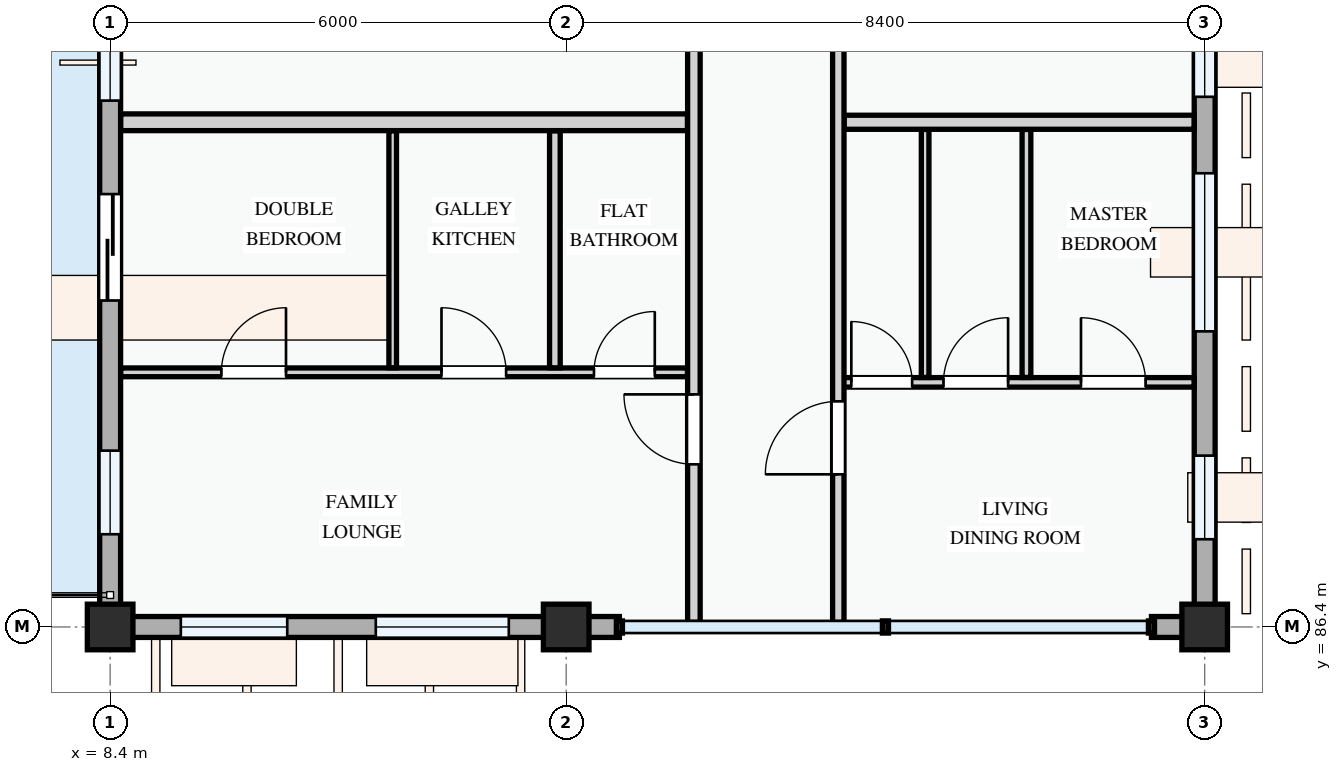
"""IFC4 building model, lengths in metres.
Left out: names, types, materials, properties, quantities, classifications, styles, units other than length and angle.
Written with IfcOpenShell. Run it as: python <this file> out.ifc"""

import sys

from ifc_helpers import new_model, si_unit, direction, frame, frame_2d, origin, origin_2d, place, context, subcontext, project, spatial, rectangle, extrude, element, fill, save


model = new_model("IFC4")
c1 = context("Model", 3, precision=1e-05, world=origin(), true_north=direction((0.0, 1.0)))
c2 = subcontext(c1, "Body", "Model", "MODEL_VIEW")
j1 = project(units=[si_unit("LENGTHUNIT", "METRE"), si_unit("PLANEANGLEUNIT", "RADIAN")], contexts=[c1])
p1 = place(None, origin())
s1 = spatial("IfcSite", under=j1, at=p1, CompositionType="ELEMENT")
p2 = place(p1, origin())
s2 = spatial("IfcBuilding", under=s1, at=p2, CompositionType="ELEMENT")
p3 = place(p2, frame((0.0, 0.0, 31.2)))
s3 = spatial("IfcBuildingStorey", under=s2, at=p3, CompositionType="ELEMENT", Elevation=31.2)
for number, where, z_axis, x_axis in (
    (1, (8.4, 86.4, 0.0), (0.0, 0.0, 1.0), (1.0, 0.0, 0.0)),
    (2, (14.4, 86.4, 0.0), (0.0, 0.0, 1.0), (1.0, 0.0, 0.0)),
    (3, (22.8, 86.4, 0.0), (0.0, 0.0, 1.0), (1.0, 0.0, 0.0)),
):
    element("IfcColumn", number, at=place(p3, frame(where, z_axis=z_axis, x_axis=x_axis)), inside=s3, PredefinedType="COLUMN", context=c2, shape_type="SweptSolid", body=[
        extrude(rectangle(XDim=0.6, YDim=0.6, at=origin_2d()), origin(), (0.0, 0.0, 1.0), 3.3),
    ])
p4 = place(p3, frame((8.4, 94.8, 0.0), z_axis=(0.0, 0.0, 1.0), x_axis=(0.0, -1.0, 0.0)))
e4 = element("IfcWall", 4, at=p4, inside=s3, PredefinedType="STANDARD", context=c2, shape_type="SweptSolid", body=[
    extrude(rectangle(XDim=8.4, YDim=0.275, at=frame_2d((4.2, 0.0))), origin(), (0.0, 0.0, 1.0), 2.425),
])
p5 = place(p4, frame((2.705, 0.0, 0.0)))
e5 = element("IfcOpeningElement", 5, at=p5, cuts=e4, PredefinedType="OPENING", context=c2, shape_type="SweptSolid", body=[
    extrude(rectangle(XDim=1.4, YDim=2.2, at=frame_2d((0.7, 1.1))), frame((0.0, 0.147, 0.0), z_axis=(0.0, -1.0, 0.0), x_axis=(1.0, 0.0, 0.0)), (0.0, 0.0, 1.0), 0.295),
])
p6 = place(p4, frame((0.475, 0.0, 0.78)))
e6 = element("IfcOpeningElement", 6, at=p6, cuts=e4, PredefinedType="OPENING", context=c2, shape_type="SweptSolid", body=[
    extrude(rectangle(XDim=1.0, YDim=1.25, at=frame_2d((0.5, 0.625))), frame((0.0, 0.147, 0.0), z_axis=(0.0, -1.0, 0.0), x_axis=(1.0, 0.0, 0.0)), (0.0, 0.0, 1.0), 0.295),
])
p7 = place(p4, frame((6.08, 0.0, 0.78)))
e7 = element("IfcOpeningElement", 7, at=p7, cuts=e4, PredefinedType="OPENING", context=c2, shape_type="SweptSolid", body=[
    extrude(rectangle(XDim=1.1, YDim=1.3, at=frame_2d((0.55, 0.65))), frame((0.0, 0.147, 0.0), z_axis=(0.0, -1.0, 0.0), x_axis=(1.0, 0.0, 0.0)), (0.0, 0.0, 1.0), 0.295),
])
p8 = place(p3, frame((8.4, 86.4, 0.0), z_axis=(0.0, 0.0, 1.0), x_axis=(1.0, 0.0, 0.0)))
e8 = element("IfcWall", 8, at=p8, inside=s3, PredefinedType="STANDARD", context=c2, shape_type="SweptSolid", body=[
    extrude(rectangle(XDim=6.0, YDim=0.275, at=frame_2d((3.0, 0.0))), origin(), (0.0, 0.0, 1.0), 2.525),
])
p9 = place(p8, frame((0.93, 0.0, 0.78)))
e9 = element("IfcOpeningElement", 9, at=p9, cuts=e8, PredefinedType="OPENING", context=c2, shape_type="SweptSolid", body=[
    extrude(rectangle(XDim=1.4, YDim=1.45, at=frame_2d((0.7, 0.725))), frame((0.0, 0.147, 0.0), z_axis=(0.0, -1.0, 0.0), x_axis=(1.0, 0.0, 0.0)), (0.0, 0.0, 1.0), 0.295),
])
p10 = place(p8, frame((3.495, 0.0, 0.78)))
e10 = element("IfcOpeningElement", 10, at=p10, cuts=e8, PredefinedType="OPENING", context=c2, shape_type="SweptSolid", body=[
    extrude(rectangle(XDim=1.75, YDim=1.45, at=frame_2d((0.875, 0.725))), frame((0.0, 0.147, 0.0), z_axis=(0.0, -1.0, 0.0), x_axis=(1.0, 0.0, 0.0)), (0.0, 0.0, 1.0), 0.295),
])
p11 = place(p3, frame((14.4, 86.4, 0.0), z_axis=(0.0, 0.0, 1.0), x_axis=(1.0, 0.0, 0.0)))
e11 = element("IfcWall", 11, at=p11, inside=s3, PredefinedType="STANDARD", context=c2, shape_type="SweptSolid", body=[
    extrude(rectangle(XDim=0.7, YDim=0.275, at=frame_2d((0.35, 0.0))), origin(), (0.0, 0.0, 1.0), 2.375),
])
p12 = place(p3, frame((22.1, 86.4, 0.0), z_axis=(0.0, 0.0, 1.0), x_axis=(1.0, 0.0, 0.0)))
e12 = element("IfcWall", 12, at=p12, inside=s3, PredefinedType="STANDARD", context=c2, shape_type="SweptSolid", body=[
    extrude(rectangle(XDim=0.56, YDim=0.275, at=frame_2d((0.28, 0.0))), origin(), (0.0, 0.0, 1.0), 2.375),
])
p13 = place(p3, frame((22.8, 86.4, 0.0), z_axis=(0.0, 0.0, 1.0), x_axis=(0.0, 1.0, 0.0)))
e13 = element("IfcWall", 13, at=p13, inside=s3, PredefinedType="STANDARD", context=c2, shape_type="SweptSolid", body=[
    extrude(rectangle(XDim=8.4, YDim=0.275, at=frame_2d((4.2, 0.0))), origin(), (0.0, 0.0, 1.0), 2.425),
])
p14 = place(p13, frame((1.154, 0.0, 0.78)))
e14 = element("IfcOpeningElement", 14, at=p14, cuts=e13, PredefinedType="OPENING", context=c2, shape_type="SweptSolid", body=[
    extrude(rectangle(XDim=1.1, YDim=1.3, at=frame_2d((0.55, 0.65))), frame((0.0, 0.147, 0.0), z_axis=(0.0, -1.0, 0.0), x_axis=(1.0, 0.0, 0.0)), (0.0, 0.0, 1.0), 0.295),
])
p15 = place(p13, frame((3.889, 0.0, 0.78)))
e15 = element("IfcOpeningElement", 15, at=p15, cuts=e13, PredefinedType="OPENING", context=c2, shape_type="SweptSolid", body=[
    extrude(rectangle(XDim=2.08, YDim=1.52, at=frame_2d((1.04, 0.76))), frame((0.0, 0.147, 0.0), z_axis=(0.0, -1.0, 0.0), x_axis=(1.0, 0.0, 0.0)), (0.0, 0.0, 1.0), 0.295),
])
p16 = place(p13, frame((6.975, 0.0, 0.78)))
e16 = element("IfcOpeningElement", 16, at=p16, cuts=e13, PredefinedType="OPENING", context=c2, shape_type="SweptSolid", body=[
    extrude(rectangle(XDim=0.9, YDim=1.2, at=frame_2d((0.45, 0.6))), frame((0.0, 0.147, 0.0), z_axis=(0.0, -1.0, 0.0), x_axis=(1.0, 0.0, 0.0)), (0.0, 0.0, 1.0), 0.295),
])
p17 = place(p3, frame((8.54, 89.75, 0.0), z_axis=(0.0, 0.0, 1.0), x_axis=(1.0, 0.0, 0.0)))
e17 = element("IfcWall", 17, at=p17, inside=s3, PredefinedType="PARTITIONING", context=c2, shape_type="SweptSolid", body=[
    extrude(rectangle(XDim=7.456, YDim=0.115, at=frame_2d((3.728, 0.0))), origin(), (0.0, 0.0, 1.0), 3.0),
])
p18 = place(p17, frame((1.324, 0.0, 0.0)))
e18 = element("IfcOpeningElement", 18, at=p18, cuts=e17, PredefinedType="OPENING", context=c2, shape_type="SweptSolid", body=[
    extrude(rectangle(XDim=0.85, YDim=2.1, at=frame_2d((0.425, 1.05))), frame((0.0, 0.067, 0.0), z_axis=(0.0, -1.0, 0.0), x_axis=(1.0, 0.0, 0.0)), (0.0, 0.0, 1.0), 0.135),
])
p19 = place(p17, frame((4.22, 0.0, 0.0)))
e19 = element("IfcOpeningElement", 19, at=p19, cuts=e17, PredefinedType="OPENING", context=c2, shape_type="SweptSolid", body=[
    extrude(rectangle(XDim=0.85, YDim=2.1, at=frame_2d((0.425, 1.05))), frame((0.0, 0.067, 0.0), z_axis=(0.0, -1.0, 0.0), x_axis=(1.0, 0.0, 0.0)), (0.0, 0.0, 1.0), 0.135),
])
p20 = place(p17, frame((6.226, 0.0, 0.0)))
e20 = element("IfcOpeningElement", 20, at=p20, cuts=e17, PredefinedType="OPENING", context=c2, shape_type="SweptSolid", body=[
    extrude(rectangle(XDim=0.8, YDim=2.1, at=frame_2d((0.4, 1.05))), frame((0.0, 0.067, 0.0), z_axis=(0.0, -1.0, 0.0), x_axis=(1.0, 0.0, 0.0)), (0.0, 0.0, 1.0), 0.135),
])
p21 = place(p3, frame((12.118, 89.81, 0.0), z_axis=(0.0, 0.0, 1.0), x_axis=(0.0, 1.0, 0.0)))
e21 = element("IfcWall", 21, at=p21, inside=s3, PredefinedType="PARTITIONING", context=c2, shape_type="SweptSolid", body=[
    extrude(rectangle(XDim=3.118, YDim=0.1, at=frame_2d((1.559, 0.0))), origin(), (0.0, 0.0, 1.0), 3.0),
])
p22 = place(p3, frame((14.251, 89.81, 0.0), z_axis=(0.0, 0.0, 1.0), x_axis=(0.0, 1.0, 0.0)))
e22 = element("IfcWall", 22, at=p22, inside=s3, PredefinedType="PARTITIONING", context=c2, shape_type="SweptSolid", body=[
    extrude(rectangle(XDim=3.118, YDim=0.14, at=frame_2d((1.559, 0.0))), origin(), (0.0, 0.0, 1.0), 2.425),
])
p23 = place(p3, frame((17.98, 89.618, 0.0), z_axis=(0.0, 0.0, 1.0), x_axis=(1.0, 0.0, 0.0)))
e23 = element("IfcWall", 23, at=p23, inside=s3, PredefinedType="PARTITIONING", context=c2, shape_type="SweptSolid", body=[
    extrude(rectangle(XDim=4.68, YDim=0.125, at=frame_2d((2.34, 0.0))), origin(), (0.0, 0.0, 1.0), 3.0),
])
p24 = place(p23, frame((0.171, 0.0, 0.0)))
e24 = element("IfcOpeningElement", 24, at=p24, cuts=e23, PredefinedType="OPENING", context=c2, shape_type="SweptSolid", body=[
    extrude(rectangle(XDim=0.8, YDim=2.1, at=frame_2d((0.4, 1.05))), frame((0.0, 0.073, 0.0), z_axis=(0.0, -1.0, 0.0), x_axis=(1.0, 0.0, 0.0)), (0.0, 0.0, 1.0), 0.145),
])
p25 = place(p23, frame((1.384, 0.0, 0.0)))
e25 = element("IfcOpeningElement", 25, at=p25, cuts=e23, PredefinedType="OPENING", context=c2, shape_type="SweptSolid", body=[
    extrude(rectangle(XDim=0.85, YDim=2.1, at=frame_2d((0.425, 1.05))), frame((0.0, 0.073, 0.0), z_axis=(0.0, -1.0, 0.0), x_axis=(1.0, 0.0, 0.0)), (0.0, 0.0, 1.0), 0.145),
])
p26 = place(p23, frame((3.193, 0.0, 0.0)))
e26 = element("IfcOpeningElement", 26, at=p26, cuts=e23, PredefinedType="OPENING", context=c2, shape_type="SweptSolid", body=[
    extrude(rectangle(XDim=0.85, YDim=2.1, at=frame_2d((0.425, 1.05))), frame((0.0, 0.073, 0.0), z_axis=(0.0, -1.0, 0.0), x_axis=(1.0, 0.0, 0.0)), (0.0, 0.0, 1.0), 0.145),
])
p27 = place(p3, frame((20.455, 89.683, 0.0), z_axis=(0.0, 0.0, 1.0), x_axis=(0.0, 1.0, 0.0)))
e27 = element("IfcWall", 27, at=p27, inside=s3, PredefinedType="PARTITIONING", context=c2, shape_type="SweptSolid", body=[
    extrude(rectangle(XDim=3.263, YDim=0.115, at=frame_2d((1.631, 0.0))), origin(), (0.0, 0.0, 1.0), 3.0),
])
p28 = place(p3, frame((19.122, 89.683, 0.0), z_axis=(0.0, 0.0, 1.0), x_axis=(0.0, 1.0, 0.0)))
e28 = element("IfcWall", 28, at=p28, inside=s3, PredefinedType="PARTITIONING", context=c2, shape_type="SweptSolid", body=[
    extrude(rectangle(XDim=3.263, YDim=0.1, at=frame_2d((1.631, 0.0))), origin(), (0.0, 0.0, 1.0), 3.0),
])
p29 = place(p3, frame((8.54, 93.04, 0.0), z_axis=(0.0, 0.0, 1.0), x_axis=(1.0, 0.0, 0.0)))
e29 = element("IfcWall", 29, at=p29, inside=s3, PredefinedType="PARTITIONING", context=c2, shape_type="SweptSolid", body=[
    extrude(rectangle(XDim=7.456, YDim=0.22, at=frame_2d((3.728, 0.0))), origin(), (0.0, 0.0, 1.0), 3.0),
])
p30 = place(p3, frame((18.057, 93.04, 0.0), z_axis=(0.0, 0.0, 1.0), x_axis=(1.0, 0.0, 0.0)))
e30 = element("IfcWall", 30, at=p30, inside=s3, PredefinedType="PARTITIONING", context=c2, shape_type="SweptSolid", body=[
    extrude(rectangle(XDim=4.604, YDim=0.185, at=frame_2d((2.302, 0.0))), origin(), (0.0, 0.0, 1.0), 3.0),
])
p31 = place(p3, frame((16.08, 86.46, 0.0), z_axis=(0.0, 0.0, 1.0), x_axis=(0.0, 1.0, 0.0)))
e31 = element("IfcWall", 31, at=p31, inside=s3, PredefinedType="PARTITIONING", context=c2, shape_type="SweptSolid", body=[
    extrude(rectangle(XDim=22.88, YDim=0.165, at=frame_2d((11.44, 0.0))), origin(), (0.0, 0.0, 1.0), 3.0),
])
p32 = place(p31, frame((2.08, 0.0, 0.0)))
e32 = element("IfcOpeningElement", 32, at=p32, cuts=e31, PredefinedType="OPENING", context=c2, shape_type="SweptSolid", body=[
    extrude(rectangle(XDim=0.92, YDim=2.1, at=frame_2d((0.46, 1.05))), frame((0.0, 0.093, 0.0), z_axis=(0.0, -1.0, 0.0), x_axis=(1.0, 0.0, 0.0)), (0.0, 0.0, 1.0), 0.185),
])
p33 = place(p31, frame((10.11, 0.0, 0.0)))
e33 = element("IfcOpeningElement", 33, at=p33, cuts=e31, PredefinedType="OPENING", context=c2, shape_type="SweptSolid", body=[
    extrude(rectangle(XDim=0.92, YDim=2.1, at=frame_2d((0.46, 1.05))), frame((0.0, 0.093, 0.0), z_axis=(0.0, -1.0, 0.0), x_axis=(1.0, 0.0, 0.0)), (0.0, 0.0, 1.0), 0.185),
])
p34 = place(p31, frame((18.077, 0.0, 0.0)))
e34 = element("IfcOpeningElement", 34, at=p34, cuts=e31, PredefinedType="OPENING", context=c2, shape_type="SweptSolid", body=[
    extrude(rectangle(XDim=0.92, YDim=2.1, at=frame_2d((0.46, 1.05))), frame((0.0, 0.093, 0.0), z_axis=(0.0, -1.0, 0.0), x_axis=(1.0, 0.0, 0.0)), (0.0, 0.0, 1.0), 0.185),
])
p35 = place(p3, frame((17.98, 86.46, 0.0), z_axis=(0.0, 0.0, 1.0), x_axis=(0.0, 1.0, 0.0)))
e35 = element("IfcWall", 35, at=p35, inside=s3, PredefinedType="PARTITIONING", context=c2, shape_type="SweptSolid", body=[
    extrude(rectangle(XDim=22.88, YDim=0.15, at=frame_2d((11.44, 0.0))), origin(), (0.0, 0.0, 1.0), 3.0),
])
p36 = place(p35, frame((1.948, 0.0, 0.0)))
e36 = element("IfcOpeningElement", 36, at=p36, cuts=e35, PredefinedType="OPENING", context=c2, shape_type="SweptSolid", body=[
    extrude(rectangle(XDim=0.96, YDim=2.12, at=frame_2d((0.48, 1.06))), frame((0.0, 0.085, 0.0), z_axis=(0.0, -1.0, 0.0), x_axis=(1.0, 0.0, 0.0)), (0.0, 0.0, 1.0), 0.17),
])
p37 = place(p35, frame((9.92, 0.0, 0.0)))
e37 = element("IfcOpeningElement", 37, at=p37, cuts=e35, PredefinedType="OPENING", context=c2, shape_type="SweptSolid", body=[
    extrude(rectangle(XDim=0.92, YDim=2.1, at=frame_2d((0.46, 1.05))), frame((0.0, 0.085, 0.0), z_axis=(0.0, -1.0, 0.0), x_axis=(1.0, 0.0, 0.0)), (0.0, 0.0, 1.0), 0.17),
])
p38 = place(p35, frame((18.067, 0.0, 0.0)))
e38 = element("IfcOpeningElement", 38, at=p38, cuts=e35, PredefinedType="OPENING", context=c2, shape_type="SweptSolid", body=[
    extrude(rectangle(XDim=0.92, YDim=2.1, at=frame_2d((0.46, 1.05))), frame((0.0, 0.085, 0.0), z_axis=(0.0, -1.0, 0.0), x_axis=(1.0, 0.0, 0.0)), (0.0, 0.0, 1.0), 0.17),
])
p39 = place(p5, frame((1.4, 0.0, 0.0), z_axis=(0.0, 0.0, 1.0), x_axis=(-1.0, 0.0, 0.0)))
e39 = element("IfcDoor", 39, at=p39, inside=s3, OperationType="SLIDING_TO_LEFT", PredefinedType="DOOR", context=c2, shape_type="SweptSolid", body=[
    extrude(rectangle(XDim=1.4, YDim=2.2, at=frame_2d((0.7, 1.1))), frame((0.0, 0.025, 0.0), z_axis=(0.0, -1.0, 0.0), x_axis=(1.0, 0.0, 0.0)), (0.0, 0.0, 1.0), 0.05),
])
fill(e5, e39)
p40 = place(p6, origin())
e40 = element("IfcWindow", 40, at=p40, inside=s3, PartitioningType="SINGLE_PANEL", PredefinedType="WINDOW", context=c2, shape_type="SweptSolid", body=[
    extrude(rectangle(XDim=1.0, YDim=1.25, at=frame_2d((0.5, 0.625))), frame((0.0, 0.03, 0.0), z_axis=(0.0, -1.0, 0.0), x_axis=(1.0, 0.0, 0.0)), (0.0, 0.0, 1.0), 0.06),
])
fill(e6, e40)
p41 = place(p7, origin())
e41 = element("IfcWindow", 41, at=p41, inside=s3, PartitioningType="SINGLE_PANEL", PredefinedType="WINDOW", context=c2, shape_type="SweptSolid", body=[
    extrude(rectangle(XDim=1.1, YDim=1.3, at=frame_2d((0.55, 0.65))), frame((0.0, 0.03, 0.0), z_axis=(0.0, -1.0, 0.0), x_axis=(1.0, 0.0, 0.0)), (0.0, 0.0, 1.0), 0.06),
])
fill(e7, e41)
p42 = place(p9, origin())
e42 = element("IfcWindow", 42, at=p42, inside=s3, PartitioningType="SINGLE_PANEL", PredefinedType="WINDOW", context=c2, shape_type="SweptSolid", body=[
    extrude(rectangle(XDim=1.4, YDim=1.45, at=frame_2d((0.7, 0.725))), frame((0.0, 0.03, 0.0), z_axis=(0.0, -1.0, 0.0), x_axis=(1.0, 0.0, 0.0)), (0.0, 0.0, 1.0), 0.06),
])
fill(e9, e42)
p43 = place(p10, origin())
e43 = element("IfcWindow", 43, at=p43, inside=s3, PartitioningType="DOUBLE_PANEL_VERTICAL", PredefinedType="WINDOW", context=c2, shape_type="SweptSolid", body=[
    extrude(rectangle(XDim=1.75, YDim=1.45, at=frame_2d((0.875, 0.725))), frame((0.0, 0.03, 0.0), z_axis=(0.0, -1.0, 0.0), x_axis=(1.0, 0.0, 0.0)), (0.0, 0.0, 1.0), 0.06),
])
fill(e10, e43)
p44 = place(p14, origin())
e44 = element("IfcWindow", 44, at=p44, inside=s3, PartitioningType="SINGLE_PANEL", PredefinedType="WINDOW", context=c2, shape_type="SweptSolid", body=[
    extrude(rectangle(XDim=1.1, YDim=1.3, at=frame_2d((0.55, 0.65))), frame((0.0, 0.03, 0.0), z_axis=(0.0, -1.0, 0.0), x_axis=(1.0, 0.0, 0.0)), (0.0, 0.0, 1.0), 0.06),
])
fill(e14, e44)
p45 = place(p15, origin())
e45 = element("IfcWindow", 45, at=p45, inside=s3, PartitioningType="DOUBLE_PANEL_VERTICAL", PredefinedType="WINDOW", context=c2, shape_type="SweptSolid", body=[
    extrude(rectangle(XDim=2.08, YDim=1.52, at=frame_2d((1.04, 0.76))), frame((0.0, 0.03, 0.0), z_axis=(0.0, -1.0, 0.0), x_axis=(1.0, 0.0, 0.0)), (0.0, 0.0, 1.0), 0.06),
])
fill(e15, e45)
p46 = place(p16, origin())
e46 = element("IfcWindow", 46, at=p46, inside=s3, PartitioningType="SINGLE_PANEL", PredefinedType="WINDOW", context=c2, shape_type="SweptSolid", body=[
    extrude(rectangle(XDim=0.9, YDim=1.2, at=frame_2d((0.45, 0.6))), frame((0.0, 0.03, 0.0), z_axis=(0.0, -1.0, 0.0), x_axis=(1.0, 0.0, 0.0)), (0.0, 0.0, 1.0), 0.06),
])
fill(e16, e46)
p47 = place(p18, origin())
e47 = element("IfcDoor", 47, at=p47, inside=s3, OperationType="SINGLE_SWING_RIGHT", PredefinedType="DOOR", context=c2, shape_type="SweptSolid", body=[
    extrude(rectangle(XDim=0.85, YDim=2.1, at=frame_2d((0.425, 1.05))), frame((0.0, 0.025, 0.0), z_axis=(0.0, -1.0, 0.0), x_axis=(1.0, 0.0, 0.0)), (0.0, 0.0, 1.0), 0.05),
])
fill(e18, e47)
p48 = place(p19, origin())
e48 = element("IfcDoor", 48, at=p48, inside=s3, OperationType="SINGLE_SWING_LEFT", PredefinedType="DOOR", context=c2, shape_type="SweptSolid", body=[
    extrude(rectangle(XDim=0.85, YDim=2.1, at=frame_2d((0.425, 1.05))), frame((0.0, 0.025, 0.0), z_axis=(0.0, -1.0, 0.0), x_axis=(1.0, 0.0, 0.0)), (0.0, 0.0, 1.0), 0.05),
])
fill(e19, e48)
p49 = place(p20, origin())
e49 = element("IfcDoor", 49, at=p49, inside=s3, OperationType="SINGLE_SWING_RIGHT", PredefinedType="DOOR", context=c2, shape_type="SweptSolid", body=[
    extrude(rectangle(XDim=0.8, YDim=2.1, at=frame_2d((0.4, 1.05))), frame((0.0, 0.025, 0.0), z_axis=(0.0, -1.0, 0.0), x_axis=(1.0, 0.0, 0.0)), (0.0, 0.0, 1.0), 0.05),
])
fill(e20, e49)
p50 = place(p24, origin())
e50 = element("IfcDoor", 50, at=p50, inside=s3, OperationType="SINGLE_SWING_LEFT", PredefinedType="DOOR", context=c2, shape_type="SweptSolid", body=[
    extrude(rectangle(XDim=0.8, YDim=2.1, at=frame_2d((0.4, 1.05))), frame((0.0, 0.025, 0.0), z_axis=(0.0, -1.0, 0.0), x_axis=(1.0, 0.0, 0.0)), (0.0, 0.0, 1.0), 0.05),
])
fill(e24, e50)
p51 = place(p25, origin())
e51 = element("IfcDoor", 51, at=p51, inside=s3, OperationType="SINGLE_SWING_RIGHT", PredefinedType="DOOR", context=c2, shape_type="SweptSolid", body=[
    extrude(rectangle(XDim=0.85, YDim=2.1, at=frame_2d((0.425, 1.05))), frame((0.0, 0.025, 0.0), z_axis=(0.0, -1.0, 0.0), x_axis=(1.0, 0.0, 0.0)), (0.0, 0.0, 1.0), 0.05),
])
fill(e25, e51)
p52 = place(p26, origin())
e52 = element("IfcDoor", 52, at=p52, inside=s3, OperationType="SINGLE_SWING_LEFT", PredefinedType="DOOR", context=c2, shape_type="SweptSolid", body=[
    extrude(rectangle(XDim=0.85, YDim=2.1, at=frame_2d((0.425, 1.05))), frame((0.0, 0.025, 0.0), z_axis=(0.0, -1.0, 0.0), x_axis=(1.0, 0.0, 0.0)), (0.0, 0.0, 1.0), 0.05),
])
fill(e26, e52)
p53 = place(p32, origin())
e53 = element("IfcDoor", 53, at=p53, inside=s3, OperationType="SINGLE_SWING_RIGHT", PredefinedType="DOOR", context=c2, shape_type="SweptSolid", body=[
    extrude(rectangle(XDim=0.92, YDim=2.1, at=frame_2d((0.46, 1.05))), frame((0.0, 0.025, 0.0), z_axis=(0.0, -1.0, 0.0), x_axis=(1.0, 0.0, 0.0)), (0.0, 0.0, 1.0), 0.05),
])
fill(e32, e53)
p54 = place(p36, origin())
e54 = element("IfcDoor", 54, at=p54, inside=s3, OperationType="SINGLE_SWING_LEFT", PredefinedType="DOOR", context=c2, shape_type="SweptSolid", body=[
    extrude(rectangle(XDim=0.96, YDim=2.12, at=frame_2d((0.48, 1.06))), frame((0.0, 0.025, 0.0), z_axis=(0.0, -1.0, 0.0), x_axis=(1.0, 0.0, 0.0)), (0.0, 0.0, 1.0), 0.05),
])
fill(e36, e54)
save(model, sys.argv[1])
